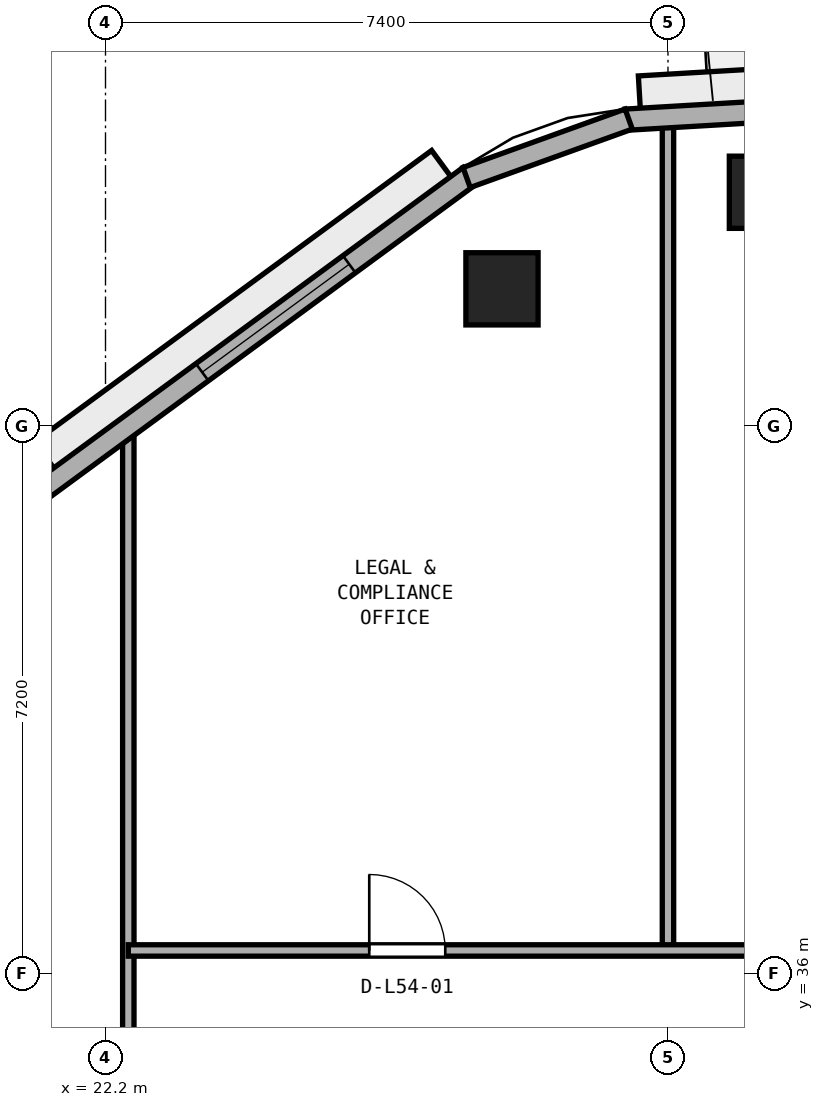
"""IFC4 building model, lengths in metres.
Left out: names, types, materials, properties, quantities, classifications, styles, units other than length and angle.
Written with IfcOpenShell. Run it as: python <this file> out.ifc"""

import sys

from ifc_helpers import new_model, si_unit, direction, frame, frame_2d, origin, origin_2d, place, context, subcontext, project, spatial, rectangle, extrude, element, fill, save


model = new_model("IFC4")
c1 = context("Model", 3, precision=1e-05, world=origin(), true_north=direction((0.0, 1.0)))
c2 = subcontext(c1, "Body", "Model", "MODEL_VIEW")
j1 = project(units=[si_unit("LENGTHUNIT", "METRE"), si_unit("PLANEANGLEUNIT", "RADIAN")], contexts=[c1])
p1 = place(None, origin())
s1 = spatial("IfcSite", under=j1, at=p1, CompositionType="ELEMENT")
p2 = place(p1, origin())
s2 = spatial("IfcBuilding", under=s1, at=p2, CompositionType="ELEMENT")
p3 = place(p2, frame((0.0, 0.0, 212.4)))
s3 = spatial("IfcBuildingStorey", under=s2, at=p3, CompositionType="ELEMENT", Elevation=212.4)
for number, where, z_axis, x_axis in (
    (1, (30.882, 46.275, 0.0), (0.0, 0.0, 1.0), (1.0, 0.0, 0.0)),
    (2, (27.416, 45.004, 0.0), (0.0, 0.0, 1.0), (1.0, 0.0, 0.0)),
):
    element("IfcColumn", number, at=place(p3, frame(where, z_axis=z_axis, x_axis=x_axis)), inside=s3, PredefinedType="COLUMN", context=c2, shape_type="SweptSolid", body=[
        extrude(rectangle(XDim=0.95, YDim=0.95, at=origin_2d()), origin(), (0.0, 0.0, 1.0), 3.8),
    ])
p4 = place(p3, frame((29.6, 36.3, 0.0), z_axis=(0.0, 0.0, 1.0), x_axis=(0.0, 1.0, 0.0)))
e3 = element("IfcWall", 3, at=p4, inside=s3, PredefinedType="PARTITIONING", context=c2, shape_type="SweptSolid", body=[
    extrude(rectangle(XDim=10.897, YDim=0.15, at=frame_2d((5.449, 0.0))), origin(), (0.0, 0.0, 1.0), 3.54),
])
p5 = place(p3, frame((22.5, 26.55, 0.0), z_axis=(0.0, 0.0, 1.0), x_axis=(0.0, 1.0, 0.0)))
e4 = element("IfcWall", 4, at=p5, inside=s3, PredefinedType="PARTITIONING", context=c2, shape_type="SweptSolid", body=[
    extrude(rectangle(XDim=16.678, YDim=0.15, at=frame_2d((8.339, 0.0))), origin(), (0.0, 0.0, 1.0), 3.54),
])
p6 = place(p5, frame((6.35, 0.0, 0.0)))
e5 = element("IfcOpeningElement", 5, at=p6, cuts=e4, PredefinedType="OPENING", context=c2, shape_type="SweptSolid", body=[
    extrude(rectangle(XDim=0.9, YDim=2.1, at=frame_2d((0.45, 1.05))), frame((0.0, 0.085, 0.0), z_axis=(0.0, -1.0, 0.0), x_axis=(1.0, 0.0, 0.0)), (0.0, 0.0, 1.0), 0.17),
])
p7 = place(p3, frame((22.5, 36.3, 0.0), z_axis=(0.0, 0.0, 1.0), x_axis=(1.0, 0.0, 0.0)))
e6 = element("IfcWall", 6, at=p7, inside=s3, PredefinedType="PARTITIONING", context=c2, shape_type="SweptSolid", body=[
    extrude(rectangle(XDim=11.9, YDim=0.15, at=frame_2d((5.95, 0.0))), origin(), (0.0, 0.0, 1.0), 3.54),
])
p8 = place(p7, frame((3.17, 0.0, 0.0)))
e7 = element("IfcOpeningElement", 7, at=p8, cuts=e6, PredefinedType="OPENING", context=c2, shape_type="SweptSolid", body=[
    extrude(rectangle(XDim=1.0, YDim=2.12, at=frame_2d((0.5, 1.06))), frame((0.0, 0.085, 0.0), z_axis=(0.0, -1.0, 0.0), x_axis=(1.0, 0.0, 0.0)), (0.0, 0.0, 1.0), 0.17),
])
p9 = place(p7, frame((8.88, 0.0, 0.0)))
e8 = element("IfcOpeningElement", 8, at=p9, cuts=e6, PredefinedType="OPENING", context=c2, shape_type="SweptSolid", body=[
    extrude(rectangle(XDim=1.0, YDim=2.12, at=frame_2d((0.5, 1.06))), frame((0.0, 0.085, 0.0), z_axis=(0.0, -1.0, 0.0), x_axis=(1.0, 0.0, 0.0)), (0.0, 0.0, 1.0), 0.17),
])
p10 = place(p3, frame((46.846, 48.277, 0.0), z_axis=(0.0, 0.0, 1.0), x_axis=(-0.998273806631, -0.05873165241, 0.0)))
e9 = element("IfcWall", 9, at=p10, inside=s3, PredefinedType="STANDARD", context=c2, shape_type="SweptSolid", body=[
    extrude(rectangle(XDim=17.833, YDim=0.28, at=frame_2d((8.917, 0.0))), origin(), (0.0, 0.0, 1.0), 3.54),
])
p11 = place(p10, frame((8.366, 0.0, 0.0)))
e10 = element("IfcOpeningElement", 10, at=p11, cuts=e9, PredefinedType="OPENING", context=c2, shape_type="SweptSolid", body=[
    extrude(rectangle(XDim=1.1, YDim=2.2, at=frame_2d((0.55, 1.1))), frame((0.0, 0.15, 0.0), z_axis=(0.0, -1.0, 0.0), x_axis=(1.0, 0.0, 0.0)), (0.0, 0.0, 1.0), 0.3),
])
p12 = place(p10, frame((2.105, 0.0, 0.9)))
e11 = element("IfcOpeningElement", 11, at=p12, cuts=e9, PredefinedType="OPENING", context=c2, shape_type="SweptSolid", body=[
    extrude(rectangle(XDim=2.4, YDim=1.75, at=frame_2d((1.2, 0.875))), frame((0.0, 0.15, 0.0), z_axis=(0.0, -1.0, 0.0), x_axis=(1.0, 0.0, 0.0)), (0.0, 0.0, 1.0), 0.3),
])
p13 = place(p10, frame((13.328, 0.0, 0.9)))
e12 = element("IfcOpeningElement", 12, at=p13, cuts=e9, PredefinedType="OPENING", context=c2, shape_type="SweptSolid", body=[
    extrude(rectangle(XDim=2.4, YDim=1.75, at=frame_2d((1.2, 0.875))), frame((0.0, 0.15, 0.0), z_axis=(0.0, -1.0, 0.0), x_axis=(1.0, 0.0, 0.0)), (0.0, 0.0, 1.0), 0.3),
])
p14 = place(p3, frame((26.986, 46.488, 0.0), z_axis=(0.0, 0.0, 1.0), x_axis=(-0.806097783211, -0.59178236194, 0.0)))
e13 = element("IfcWall", 13, at=p14, inside=s3, PredefinedType="STANDARD", context=c2, shape_type="SweptSolid", body=[
    extrude(rectangle(XDim=16.959, YDim=0.28, at=frame_2d((8.479, 0.0))), origin(), (0.0, 0.0, 1.0), 3.54),
])
p15 = place(p14, frame((1.96, 0.0, 0.9)))
e14 = element("IfcOpeningElement", 14, at=p15, cuts=e13, PredefinedType="OPENING", context=c2, shape_type="SweptSolid", body=[
    extrude(rectangle(XDim=2.4, YDim=1.75, at=frame_2d((1.2, 0.875))), frame((0.0, 0.15, 0.0), z_axis=(0.0, -1.0, 0.0), x_axis=(1.0, 0.0, 0.0)), (0.0, 0.0, 1.0), 0.3),
])
p16 = place(p14, frame((7.279, 0.0, 0.9)))
e15 = element("IfcOpeningElement", 15, at=p16, cuts=e13, PredefinedType="OPENING", context=c2, shape_type="SweptSolid", body=[
    extrude(rectangle(XDim=2.4, YDim=1.75, at=frame_2d((1.2, 0.875))), frame((0.0, 0.15, 0.0), z_axis=(0.0, -1.0, 0.0), x_axis=(1.0, 0.0, 0.0)), (0.0, 0.0, 1.0), 0.3),
])
p17 = place(p14, frame((12.599, 0.0, 0.9)))
e16 = element("IfcOpeningElement", 16, at=p17, cuts=e13, PredefinedType="OPENING", context=c2, shape_type="SweptSolid", body=[
    extrude(rectangle(XDim=2.4, YDim=1.75, at=frame_2d((1.2, 0.875))), frame((0.0, 0.15, 0.0), z_axis=(0.0, -1.0, 0.0), x_axis=(1.0, 0.0, 0.0)), (0.0, 0.0, 1.0), 0.3),
])
p18 = place(p3, frame((29.083, 47.238, 0.0), z_axis=(0.0, 0.0, 1.0), x_axis=(-0.940723909279, -0.33917329864, 0.0)))
e17 = element("IfcWall", 17, at=p18, inside=s3, PredefinedType="STANDARD", context=c2, shape_type="SweptSolid", body=[
    extrude(rectangle(XDim=2.267, YDim=0.28, at=frame_2d((1.133, 0.0))), origin(), (0.0, 0.0, 1.0), 3.54),
])
p19 = place(p8, origin())
e18 = element("IfcDoor", 18, at=p19, inside=s3, OperationType="SINGLE_SWING_LEFT", PredefinedType="DOOR", context=c2, shape_type="SweptSolid", body=[
    extrude(rectangle(XDim=1.0, YDim=2.12, at=frame_2d((0.5, 1.06))), frame((0.0, 0.025, 0.0), z_axis=(0.0, -1.0, 0.0), x_axis=(1.0, 0.0, 0.0)), (0.0, 0.0, 1.0), 0.05),
])
fill(e7, e18)
p20 = place(p15, origin())
e19 = element("IfcWindow", 19, at=p20, inside=s3, PartitioningType="SINGLE_PANEL", PredefinedType="WINDOW", context=c2, shape_type="SweptSolid", body=[
    extrude(rectangle(XDim=2.4, YDim=1.75, at=frame_2d((1.2, 0.875))), frame((0.0, 0.03, 0.0), z_axis=(0.0, -1.0, 0.0), x_axis=(1.0, 0.0, 0.0)), (0.0, 0.0, 1.0), 0.06),
])
fill(e14, e19)
save(model, sys.argv[1])
